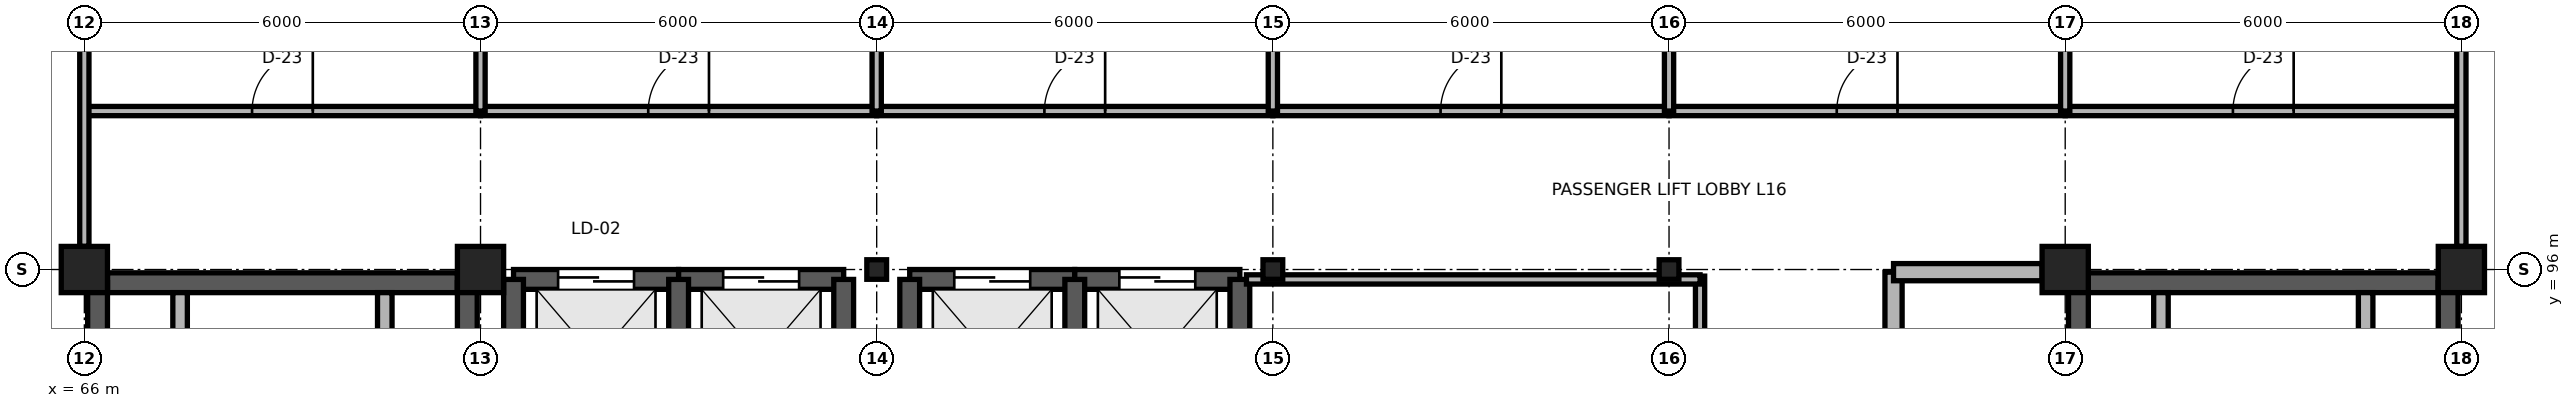
"""IFC4 building model, lengths in metres.
Left out: names, types, materials, properties, quantities, classifications, styles, units other than length and angle.
Written with IfcOpenShell. Run it as: python <this file> out.ifc"""

import sys

from ifc_helpers import new_model, si_unit, direction, frame, frame_2d, origin, origin_2d, place, context, subcontext, project, spatial, rectangle, i_section, extrude, element, fill, save


model = new_model("IFC4")
c1 = context("Model", 3, precision=1e-05, world=origin(), true_north=direction((0.0, 1.0)))
c2 = subcontext(c1, "Body", "Model", "MODEL_VIEW")
j1 = project(units=[si_unit("LENGTHUNIT", "METRE"), si_unit("PLANEANGLEUNIT", "RADIAN")], contexts=[c1])
p1 = place(None, origin())
s1 = spatial("IfcSite", under=j1, at=p1, CompositionType="ELEMENT")
p2 = place(p1, origin())
s2 = spatial("IfcBuilding", under=s1, at=p2, CompositionType="ELEMENT")
p3 = place(p2, frame((0.0, 0.0, 63.9)))
s3 = spatial("IfcBuildingStorey", under=s2, at=p3, CompositionType="ELEMENT", Elevation=63.9)
for number, where, z_axis, x_axis in (
    (1, (66.0, 96.0, 0.0), (0.0, 0.0, 1.0), (1.0, 0.0, 0.0)),
    (2, (72.0, 96.0, 0.0), (0.0, 0.0, 1.0), (1.0, 0.0, 0.0)),
):
    element("IfcColumn", number, at=place(p3, frame(where, z_axis=z_axis, x_axis=x_axis)), inside=s3, PredefinedType="COLUMN", context=c2, shape_type="SweptSolid", body=[
        extrude(rectangle(XDim=0.7, YDim=0.7, at=origin_2d()), origin(), (0.0, 0.0, 1.0), 3.9),
    ])
for number, where, z_axis, x_axis in (
    (3, (78.0, 96.0, 0.0), (0.0, 0.0, 1.0), (1.0, 0.0, 0.0)),
    (4, (84.0, 96.0, 0.0), (0.0, 0.0, 1.0), (1.0, 0.0, 0.0)),
    (5, (90.0, 96.0, 0.0), (0.0, 0.0, 1.0), (1.0, 0.0, 0.0)),
):
    element("IfcColumn", number, at=place(p3, frame(where, z_axis=z_axis, x_axis=x_axis)), inside=s3, PredefinedType="COLUMN", context=c2, shape_type="SweptSolid", body=[
        extrude(i_section(OverallWidth=0.299, OverallDepth=0.296, WebThickness=0.009, FlangeThickness=0.014, FilletRadius=0.018, at=origin_2d()), origin(), (0.0, 0.0, 1.0), 3.9),
    ])
for number, where, z_axis, x_axis in (
    (6, (96.0, 96.0, 0.0), (0.0, 0.0, 1.0), (1.0, 0.0, 0.0)),
    (7, (102.0, 96.0, 0.0), (0.0, 0.0, 1.0), (1.0, 0.0, 0.0)),
):
    element("IfcColumn", number, at=place(p3, frame(where, z_axis=z_axis, x_axis=x_axis)), inside=s3, PredefinedType="COLUMN", context=c2, shape_type="SweptSolid", body=[
        extrude(rectangle(XDim=0.7, YDim=0.7, at=origin_2d()), origin(), (0.0, 0.0, 1.0), 3.9),
    ])
p4 = place(p3, frame((66.35, 95.8, 0.0), z_axis=(0.0, 0.0, 1.0), x_axis=(1.0, 0.0, 0.0)))
e8 = element("IfcWall", 8, at=p4, inside=s3, PredefinedType="SHEAR", context=c2, shape_type="SweptSolid", body=[
    extrude(rectangle(XDim=5.3, YDim=0.3, at=frame_2d((2.65, 0.0))), origin(), (0.0, 0.0, 1.0), 3.66),
])
for number, where, z_axis, x_axis in (
    (9, (66.2, 84.0, 0.0), (0.0, 0.0, 1.0), (0.0, 1.0, 0.0)),
    (10, (71.8, 84.0, 0.0), (0.0, 0.0, 1.0), (0.0, 1.0, 0.0)),
):
    element("IfcWall", number, at=place(p3, frame(where, z_axis=z_axis, x_axis=x_axis)), inside=s3, PredefinedType="SHEAR", context=c2, shape_type="SweptSolid", body=[
        extrude(rectangle(XDim=11.8, YDim=0.3, at=frame_2d((5.9, 0.0))), origin(), (0.0, 0.0, 1.0), 3.66),
    ])
for number, where, z_axis, x_axis in (
    (11, (67.45, 94.4, 0.0), (0.0, 0.0, 1.0), (0.0, 1.0, 0.0)),
    (12, (70.55, 94.4, 0.0), (0.0, 0.0, 1.0), (0.0, 1.0, 0.0)),
):
    element("IfcWall", number, at=place(p3, frame(where, z_axis=z_axis, x_axis=x_axis)), inside=s3, PredefinedType="PARTITIONING", context=c2, shape_type="SweptSolid", body=[
        extrude(rectangle(XDim=1.25, YDim=0.22, at=frame_2d((0.625, 0.0))), origin(), (0.0, 0.0, 1.0), 3.66),
    ])
p5 = place(p3, frame((96.35, 95.8, 0.0), z_axis=(0.0, 0.0, 1.0), x_axis=(1.0, 0.0, 0.0)))
e13 = element("IfcWall", 13, at=p5, inside=s3, PredefinedType="SHEAR", context=c2, shape_type="SweptSolid", body=[
    extrude(rectangle(XDim=5.3, YDim=0.3, at=frame_2d((2.65, 0.0))), origin(), (0.0, 0.0, 1.0), 3.66),
])
for number, where, z_axis, x_axis in (
    (14, (96.2, 84.0, 0.0), (0.0, 0.0, 1.0), (0.0, 1.0, 0.0)),
    (15, (101.8, 84.0, 0.0), (0.0, 0.0, 1.0), (0.0, 1.0, 0.0)),
):
    element("IfcWall", number, at=place(p3, frame(where, z_axis=z_axis, x_axis=x_axis)), inside=s3, PredefinedType="SHEAR", context=c2, shape_type="SweptSolid", body=[
        extrude(rectangle(XDim=11.8, YDim=0.3, at=frame_2d((5.9, 0.0))), origin(), (0.0, 0.0, 1.0), 3.66),
    ])
for number, where, z_axis, x_axis in (
    (16, (97.45, 94.4, 0.0), (0.0, 0.0, 1.0), (0.0, 1.0, 0.0)),
    (17, (100.55, 94.4, 0.0), (0.0, 0.0, 1.0), (0.0, 1.0, 0.0)),
):
    element("IfcWall", number, at=place(p3, frame(where, z_axis=z_axis, x_axis=x_axis)), inside=s3, PredefinedType="PARTITIONING", context=c2, shape_type="SweptSolid", body=[
        extrude(rectangle(XDim=1.25, YDim=0.22, at=frame_2d((0.625, 0.0))), origin(), (0.0, 0.0, 1.0), 3.66),
    ])
p6 = place(p3, frame((72.5, 95.85, 0.0), z_axis=(0.0, 0.0, 1.0), x_axis=(1.0, 0.0, 0.0)))
e18 = element("IfcWall", 18, at=p6, inside=s3, PredefinedType="SHEAR", context=c2, shape_type="SweptSolid", body=[
    extrude(rectangle(XDim=2.5, YDim=0.3, at=frame_2d((1.25, 0.0))), origin(), (0.0, 0.0, 1.0), 3.66),
])
p7 = place(p6, frame((0.675, 0.0, 0.0)))
e19 = element("IfcOpeningElement", 19, at=p7, cuts=e18, PredefinedType="OPENING", context=c2, shape_type="SweptSolid", body=[
    extrude(rectangle(XDim=1.15, YDim=2.15, at=frame_2d((0.575, 1.075))), frame((0.0, 0.165, 0.0), z_axis=(0.0, -1.0, 0.0), x_axis=(1.0, 0.0, 0.0)), (0.0, 0.0, 1.0), 0.33),
])
p8 = place(p3, frame((72.5, 92.45, 0.0), z_axis=(0.0, 0.0, 1.0), x_axis=(0.0, 1.0, 0.0)))
e20 = element("IfcWall", 20, at=p8, inside=s3, PredefinedType="SHEAR", context=c2, shape_type="SweptSolid", body=[
    extrude(rectangle(XDim=3.4, YDim=0.3, at=frame_2d((1.7, 0.0))), origin(), (0.0, 0.0, 1.0), 3.66),
])
p9 = place(p3, frame((75.0, 95.85, 0.0), z_axis=(0.0, 0.0, 1.0), x_axis=(1.0, 0.0, 0.0)))
e21 = element("IfcWall", 21, at=p9, inside=s3, PredefinedType="SHEAR", context=c2, shape_type="SweptSolid", body=[
    extrude(rectangle(XDim=2.5, YDim=0.3, at=frame_2d((1.25, 0.0))), origin(), (0.0, 0.0, 1.0), 3.66),
])
p10 = place(p9, frame((0.675, 0.0, 0.0)))
e22 = element("IfcOpeningElement", 22, at=p10, cuts=e21, PredefinedType="OPENING", context=c2, shape_type="SweptSolid", body=[
    extrude(rectangle(XDim=1.15, YDim=2.15, at=frame_2d((0.575, 1.075))), frame((0.0, 0.165, 0.0), z_axis=(0.0, -1.0, 0.0), x_axis=(1.0, 0.0, 0.0)), (0.0, 0.0, 1.0), 0.33),
])
for number, where, z_axis, x_axis in (
    (23, (75.0, 92.45, 0.0), (0.0, 0.0, 1.0), (0.0, 1.0, 0.0)),
    (24, (77.5, 92.45, 0.0), (0.0, 0.0, 1.0), (0.0, 1.0, 0.0)),
):
    element("IfcWall", number, at=place(p3, frame(where, z_axis=z_axis, x_axis=x_axis)), inside=s3, PredefinedType="SHEAR", context=c2, shape_type="SweptSolid", body=[
        extrude(rectangle(XDim=3.4, YDim=0.3, at=frame_2d((1.7, 0.0))), origin(), (0.0, 0.0, 1.0), 3.66),
    ])
p11 = place(p3, frame((78.5, 95.85, 0.0), z_axis=(0.0, 0.0, 1.0), x_axis=(1.0, 0.0, 0.0)))
e25 = element("IfcWall", 25, at=p11, inside=s3, PredefinedType="SHEAR", context=c2, shape_type="SweptSolid", body=[
    extrude(rectangle(XDim=2.5, YDim=0.3, at=frame_2d((1.25, 0.0))), origin(), (0.0, 0.0, 1.0), 3.66),
])
p12 = place(p11, frame((0.675, 0.0, 0.0)))
e26 = element("IfcOpeningElement", 26, at=p12, cuts=e25, PredefinedType="OPENING", context=c2, shape_type="SweptSolid", body=[
    extrude(rectangle(XDim=1.15, YDim=2.15, at=frame_2d((0.575, 1.075))), frame((0.0, 0.165, 0.0), z_axis=(0.0, -1.0, 0.0), x_axis=(1.0, 0.0, 0.0)), (0.0, 0.0, 1.0), 0.33),
])
p13 = place(p3, frame((78.5, 92.45, 0.0), z_axis=(0.0, 0.0, 1.0), x_axis=(0.0, 1.0, 0.0)))
e27 = element("IfcWall", 27, at=p13, inside=s3, PredefinedType="SHEAR", context=c2, shape_type="SweptSolid", body=[
    extrude(rectangle(XDim=3.4, YDim=0.3, at=frame_2d((1.7, 0.0))), origin(), (0.0, 0.0, 1.0), 3.66),
])
p14 = place(p3, frame((81.0, 95.85, 0.0), z_axis=(0.0, 0.0, 1.0), x_axis=(1.0, 0.0, 0.0)))
e28 = element("IfcWall", 28, at=p14, inside=s3, PredefinedType="SHEAR", context=c2, shape_type="SweptSolid", body=[
    extrude(rectangle(XDim=2.5, YDim=0.3, at=frame_2d((1.25, 0.0))), origin(), (0.0, 0.0, 1.0), 3.66),
])
p15 = place(p14, frame((0.675, 0.0, 0.0)))
e29 = element("IfcOpeningElement", 29, at=p15, cuts=e28, PredefinedType="OPENING", context=c2, shape_type="SweptSolid", body=[
    extrude(rectangle(XDim=1.15, YDim=2.15, at=frame_2d((0.575, 1.075))), frame((0.0, 0.165, 0.0), z_axis=(0.0, -1.0, 0.0), x_axis=(1.0, 0.0, 0.0)), (0.0, 0.0, 1.0), 0.33),
])
for number, where, z_axis, x_axis in (
    (30, (81.0, 92.45, 0.0), (0.0, 0.0, 1.0), (0.0, 1.0, 0.0)),
    (31, (83.5, 92.45, 0.0), (0.0, 0.0, 1.0), (0.0, 1.0, 0.0)),
):
    element("IfcWall", number, at=place(p3, frame(where, z_axis=z_axis, x_axis=x_axis)), inside=s3, PredefinedType="SHEAR", context=c2, shape_type="SweptSolid", body=[
        extrude(rectangle(XDim=3.4, YDim=0.3, at=frame_2d((1.7, 0.0))), origin(), (0.0, 0.0, 1.0), 3.66),
    ])
p16 = place(p3, frame((93.4, 84.0, 0.0), z_axis=(0.0, 0.0, 1.0), x_axis=(0.0, 1.0, 0.0)))
e32 = element("IfcWall", 32, at=p16, inside=s3, PredefinedType="PARTITIONING", context=c2, shape_type="SweptSolid", body=[
    extrude(rectangle(XDim=11.96, YDim=0.26, at=frame_2d((5.98, 0.0))), origin(), (0.0, 0.0, 1.0), 3.66),
])
p17 = place(p16, frame((3.425, 0.0, 0.0)))
e33 = element("IfcOpeningElement", 33, at=p17, cuts=e32, PredefinedType="OPENING", context=c2, shape_type="SweptSolid", body=[
    extrude(rectangle(XDim=1.15, YDim=2.2, at=frame_2d((0.575, 1.1))), frame((0.0, 0.145, 0.0), z_axis=(0.0, -1.0, 0.0), x_axis=(1.0, 0.0, 0.0)), (0.0, 0.0, 1.0), 0.29),
])
p18 = place(p3, frame((93.4, 95.96, 0.0), z_axis=(0.0, 0.0, 1.0), x_axis=(1.0, 0.0, 0.0)))
e34 = element("IfcWall", 34, at=p18, inside=s3, PredefinedType="PARTITIONING", context=c2, shape_type="SweptSolid", body=[
    extrude(rectangle(XDim=2.25, YDim=0.26, at=frame_2d((1.125, 0.0))), origin(), (0.0, 0.0, 1.0), 3.369),
])
p19 = place(p3, frame((90.47, 92.5, 0.0), z_axis=(0.0, 0.0, 1.0), x_axis=(0.0, 1.0, 0.0)))
e35 = element("IfcWall", 35, at=p19, inside=s3, PredefinedType="PARTITIONING", context=c2, shape_type="SweptSolid", body=[
    extrude(rectangle(XDim=3.4, YDim=0.14, at=frame_2d((1.7, 0.0))), origin(), (0.0, 0.0, 1.0), 3.66),
])
p20 = place(p19, frame((1.24, 0.0, 0.0)))
e36 = element("IfcOpeningElement", 36, at=p20, cuts=e35, PredefinedType="OPENING", context=c2, shape_type="SweptSolid", body=[
    extrude(rectangle(XDim=0.92, YDim=2.15, at=frame_2d((0.46, 1.075))), frame((0.0, 0.085, 0.0), z_axis=(0.0, -1.0, 0.0), x_axis=(1.0, 0.0, 0.0)), (0.0, 0.0, 1.0), 0.17),
])
p21 = place(p3, frame((66.0, 98.4, 0.0), z_axis=(0.0, 0.0, 1.0), x_axis=(1.0, 0.0, 0.0)))
e37 = element("IfcWall", 37, at=p21, inside=s3, PredefinedType="PARTITIONING", context=c2, shape_type="SweptSolid", body=[
    extrude(rectangle(XDim=6.0, YDim=0.14, at=frame_2d((3.0, 0.0))), origin(), (0.0, 0.0, 1.0), 3.66),
])
p22 = place(p21, frame((2.54, 0.0, 0.0)))
e38 = element("IfcOpeningElement", 38, at=p22, cuts=e37, PredefinedType="OPENING", context=c2, shape_type="SweptSolid", body=[
    extrude(rectangle(XDim=0.92, YDim=2.15, at=frame_2d((0.46, 1.075))), frame((0.0, 0.085, 0.0), z_axis=(0.0, -1.0, 0.0), x_axis=(1.0, 0.0, 0.0)), (0.0, 0.0, 1.0), 0.17),
])
p23 = place(p3, frame((72.0, 98.4, 0.0), z_axis=(0.0, 0.0, 1.0), x_axis=(1.0, 0.0, 0.0)))
e39 = element("IfcWall", 39, at=p23, inside=s3, PredefinedType="PARTITIONING", context=c2, shape_type="SweptSolid", body=[
    extrude(rectangle(XDim=6.0, YDim=0.14, at=frame_2d((3.0, 0.0))), origin(), (0.0, 0.0, 1.0), 3.66),
])
p24 = place(p23, frame((2.54, 0.0, 0.0)))
e40 = element("IfcOpeningElement", 40, at=p24, cuts=e39, PredefinedType="OPENING", context=c2, shape_type="SweptSolid", body=[
    extrude(rectangle(XDim=0.92, YDim=2.15, at=frame_2d((0.46, 1.075))), frame((0.0, 0.085, 0.0), z_axis=(0.0, -1.0, 0.0), x_axis=(1.0, 0.0, 0.0)), (0.0, 0.0, 1.0), 0.17),
])
p25 = place(p3, frame((78.0, 98.4, 0.0), z_axis=(0.0, 0.0, 1.0), x_axis=(1.0, 0.0, 0.0)))
e41 = element("IfcWall", 41, at=p25, inside=s3, PredefinedType="PARTITIONING", context=c2, shape_type="SweptSolid", body=[
    extrude(rectangle(XDim=6.0, YDim=0.14, at=frame_2d((3.0, 0.0))), origin(), (0.0, 0.0, 1.0), 3.66),
])
p26 = place(p25, frame((2.54, 0.0, 0.0)))
e42 = element("IfcOpeningElement", 42, at=p26, cuts=e41, PredefinedType="OPENING", context=c2, shape_type="SweptSolid", body=[
    extrude(rectangle(XDim=0.92, YDim=2.15, at=frame_2d((0.46, 1.075))), frame((0.0, 0.085, 0.0), z_axis=(0.0, -1.0, 0.0), x_axis=(1.0, 0.0, 0.0)), (0.0, 0.0, 1.0), 0.17),
])
p27 = place(p3, frame((84.0, 98.4, 0.0), z_axis=(0.0, 0.0, 1.0), x_axis=(1.0, 0.0, 0.0)))
e43 = element("IfcWall", 43, at=p27, inside=s3, PredefinedType="PARTITIONING", context=c2, shape_type="SweptSolid", body=[
    extrude(rectangle(XDim=6.0, YDim=0.14, at=frame_2d((3.0, 0.0))), origin(), (0.0, 0.0, 1.0), 3.66),
])
p28 = place(p27, frame((2.54, 0.0, 0.0)))
e44 = element("IfcOpeningElement", 44, at=p28, cuts=e43, PredefinedType="OPENING", context=c2, shape_type="SweptSolid", body=[
    extrude(rectangle(XDim=0.92, YDim=2.15, at=frame_2d((0.46, 1.075))), frame((0.0, 0.085, 0.0), z_axis=(0.0, -1.0, 0.0), x_axis=(1.0, 0.0, 0.0)), (0.0, 0.0, 1.0), 0.17),
])
p29 = place(p3, frame((90.0, 98.4, 0.0), z_axis=(0.0, 0.0, 1.0), x_axis=(1.0, 0.0, 0.0)))
e45 = element("IfcWall", 45, at=p29, inside=s3, PredefinedType="PARTITIONING", context=c2, shape_type="SweptSolid", body=[
    extrude(rectangle(XDim=6.0, YDim=0.14, at=frame_2d((3.0, 0.0))), origin(), (0.0, 0.0, 1.0), 3.66),
])
p30 = place(p29, frame((2.54, 0.0, 0.0)))
e46 = element("IfcOpeningElement", 46, at=p30, cuts=e45, PredefinedType="OPENING", context=c2, shape_type="SweptSolid", body=[
    extrude(rectangle(XDim=0.92, YDim=2.15, at=frame_2d((0.46, 1.075))), frame((0.0, 0.085, 0.0), z_axis=(0.0, -1.0, 0.0), x_axis=(1.0, 0.0, 0.0)), (0.0, 0.0, 1.0), 0.17),
])
p31 = place(p3, frame((96.0, 98.4, 0.0), z_axis=(0.0, 0.0, 1.0), x_axis=(1.0, 0.0, 0.0)))
e47 = element("IfcWall", 47, at=p31, inside=s3, PredefinedType="PARTITIONING", context=c2, shape_type="SweptSolid", body=[
    extrude(rectangle(XDim=6.0, YDim=0.14, at=frame_2d((3.0, 0.0))), origin(), (0.0, 0.0, 1.0), 3.66),
])
p32 = place(p31, frame((2.54, 0.0, 0.0)))
e48 = element("IfcOpeningElement", 48, at=p32, cuts=e47, PredefinedType="OPENING", context=c2, shape_type="SweptSolid", body=[
    extrude(rectangle(XDim=0.92, YDim=2.15, at=frame_2d((0.46, 1.075))), frame((0.0, 0.085, 0.0), z_axis=(0.0, -1.0, 0.0), x_axis=(1.0, 0.0, 0.0)), (0.0, 0.0, 1.0), 0.17),
])
p33 = place(p3, frame((83.6, 95.85, 0.0), z_axis=(0.0, 0.0, 1.0), x_axis=(1.0, 0.0, 0.0)))
e49 = element("IfcWall", 49, at=p33, inside=s3, PredefinedType="PARTITIONING", context=c2, shape_type="SweptSolid", body=[
    extrude(rectangle(XDim=6.87, YDim=0.14, at=frame_2d((3.435, 0.0))), origin(), (0.0, 0.0, 1.0), 3.66),
])
for number, where, z_axis, x_axis in (
    (50, (72.0, 98.4, 0.0), (0.0, 0.0, 1.0), (0.0, 1.0, 0.0)),
    (51, (78.0, 98.4, 0.0), (0.0, 0.0, 1.0), (0.0, 1.0, 0.0)),
    (52, (84.0, 98.4, 0.0), (0.0, 0.0, 1.0), (0.0, 1.0, 0.0)),
    (53, (90.0, 98.4, 0.0), (0.0, 0.0, 1.0), (0.0, 1.0, 0.0)),
    (54, (96.0, 98.4, 0.0), (0.0, 0.0, 1.0), (0.0, 1.0, 0.0)),
):
    element("IfcWall", number, at=place(p3, frame(where, z_axis=z_axis, x_axis=x_axis)), inside=s3, PredefinedType="PARTITIONING", context=c2, shape_type="SweptSolid", body=[
        extrude(rectangle(XDim=3.15, YDim=0.14, at=frame_2d((1.575, 0.0))), origin(), (0.0, 0.0, 1.0), 3.369),
    ])
for number, where, z_axis, x_axis in (
    (55, (66.0, 96.35, 0.0), (0.0, 0.0, 1.0), (0.0, 1.0, 0.0)),
    (56, (102.0, 96.35, 0.0), (0.0, 0.0, 1.0), (0.0, 1.0, 0.0)),
):
    element("IfcWall", number, at=place(p3, frame(where, z_axis=z_axis, x_axis=x_axis)), inside=s3, PredefinedType="PARTITIONING", context=c2, shape_type="SweptSolid", body=[
        extrude(rectangle(XDim=5.3, YDim=0.14, at=frame_2d((2.65, 0.0))), origin(), (0.0, 0.0, 1.0), 3.369),
    ])
p34 = place(p7, origin())
e57 = element("IfcDoor", 57, at=p34, inside=s3, OperationType="DOUBLE_DOOR_SLIDING", PredefinedType="DOOR", context=c2, shape_type="SweptSolid", body=[
    extrude(rectangle(XDim=1.15, YDim=2.15, at=frame_2d((0.575, 1.075))), frame((0.0, 0.025, 0.0), z_axis=(0.0, -1.0, 0.0), x_axis=(1.0, 0.0, 0.0)), (0.0, 0.0, 1.0), 0.05),
])
fill(e19, e57)
p35 = place(p10, origin())
e58 = element("IfcDoor", 58, at=p35, inside=s3, OperationType="DOUBLE_DOOR_SLIDING", PredefinedType="DOOR", context=c2, shape_type="SweptSolid", body=[
    extrude(rectangle(XDim=1.15, YDim=2.15, at=frame_2d((0.575, 1.075))), frame((0.0, 0.025, 0.0), z_axis=(0.0, -1.0, 0.0), x_axis=(1.0, 0.0, 0.0)), (0.0, 0.0, 1.0), 0.05),
])
fill(e22, e58)
p36 = place(p12, origin())
e59 = element("IfcDoor", 59, at=p36, inside=s3, OperationType="DOUBLE_DOOR_SLIDING", PredefinedType="DOOR", context=c2, shape_type="SweptSolid", body=[
    extrude(rectangle(XDim=1.15, YDim=2.15, at=frame_2d((0.575, 1.075))), frame((0.0, 0.025, 0.0), z_axis=(0.0, -1.0, 0.0), x_axis=(1.0, 0.0, 0.0)), (0.0, 0.0, 1.0), 0.05),
])
fill(e26, e59)
p37 = place(p15, origin())
e60 = element("IfcDoor", 60, at=p37, inside=s3, OperationType="DOUBLE_DOOR_SLIDING", PredefinedType="DOOR", context=c2, shape_type="SweptSolid", body=[
    extrude(rectangle(XDim=1.15, YDim=2.15, at=frame_2d((0.575, 1.075))), frame((0.0, 0.025, 0.0), z_axis=(0.0, -1.0, 0.0), x_axis=(1.0, 0.0, 0.0)), (0.0, 0.0, 1.0), 0.05),
])
fill(e29, e60)
p38 = place(p22, origin())
e61 = element("IfcDoor", 61, at=p38, inside=s3, OperationType="SINGLE_SWING_RIGHT", PredefinedType="DOOR", context=c2, shape_type="SweptSolid", body=[
    extrude(rectangle(XDim=0.92, YDim=2.15, at=frame_2d((0.46, 1.075))), frame((0.0, 0.025, 0.0), z_axis=(0.0, -1.0, 0.0), x_axis=(1.0, 0.0, 0.0)), (0.0, 0.0, 1.0), 0.05),
])
fill(e38, e61)
p39 = place(p24, origin())
e62 = element("IfcDoor", 62, at=p39, inside=s3, OperationType="SINGLE_SWING_RIGHT", PredefinedType="DOOR", context=c2, shape_type="SweptSolid", body=[
    extrude(rectangle(XDim=0.92, YDim=2.15, at=frame_2d((0.46, 1.075))), frame((0.0, 0.025, 0.0), z_axis=(0.0, -1.0, 0.0), x_axis=(1.0, 0.0, 0.0)), (0.0, 0.0, 1.0), 0.05),
])
fill(e40, e62)
p40 = place(p26, origin())
e63 = element("IfcDoor", 63, at=p40, inside=s3, OperationType="SINGLE_SWING_RIGHT", PredefinedType="DOOR", context=c2, shape_type="SweptSolid", body=[
    extrude(rectangle(XDim=0.92, YDim=2.15, at=frame_2d((0.46, 1.075))), frame((0.0, 0.025, 0.0), z_axis=(0.0, -1.0, 0.0), x_axis=(1.0, 0.0, 0.0)), (0.0, 0.0, 1.0), 0.05),
])
fill(e42, e63)
p41 = place(p28, origin())
e64 = element("IfcDoor", 64, at=p41, inside=s3, OperationType="SINGLE_SWING_RIGHT", PredefinedType="DOOR", context=c2, shape_type="SweptSolid", body=[
    extrude(rectangle(XDim=0.92, YDim=2.15, at=frame_2d((0.46, 1.075))), frame((0.0, 0.025, 0.0), z_axis=(0.0, -1.0, 0.0), x_axis=(1.0, 0.0, 0.0)), (0.0, 0.0, 1.0), 0.05),
])
fill(e44, e64)
p42 = place(p30, origin())
e65 = element("IfcDoor", 65, at=p42, inside=s3, OperationType="SINGLE_SWING_RIGHT", PredefinedType="DOOR", context=c2, shape_type="SweptSolid", body=[
    extrude(rectangle(XDim=0.92, YDim=2.15, at=frame_2d((0.46, 1.075))), frame((0.0, 0.025, 0.0), z_axis=(0.0, -1.0, 0.0), x_axis=(1.0, 0.0, 0.0)), (0.0, 0.0, 1.0), 0.05),
])
fill(e46, e65)
p43 = place(p32, origin())
e66 = element("IfcDoor", 66, at=p43, inside=s3, OperationType="SINGLE_SWING_RIGHT", PredefinedType="DOOR", context=c2, shape_type="SweptSolid", body=[
    extrude(rectangle(XDim=0.92, YDim=2.15, at=frame_2d((0.46, 1.075))), frame((0.0, 0.025, 0.0), z_axis=(0.0, -1.0, 0.0), x_axis=(1.0, 0.0, 0.0)), (0.0, 0.0, 1.0), 0.05),
])
fill(e48, e66)
save(model, sys.argv[1])
